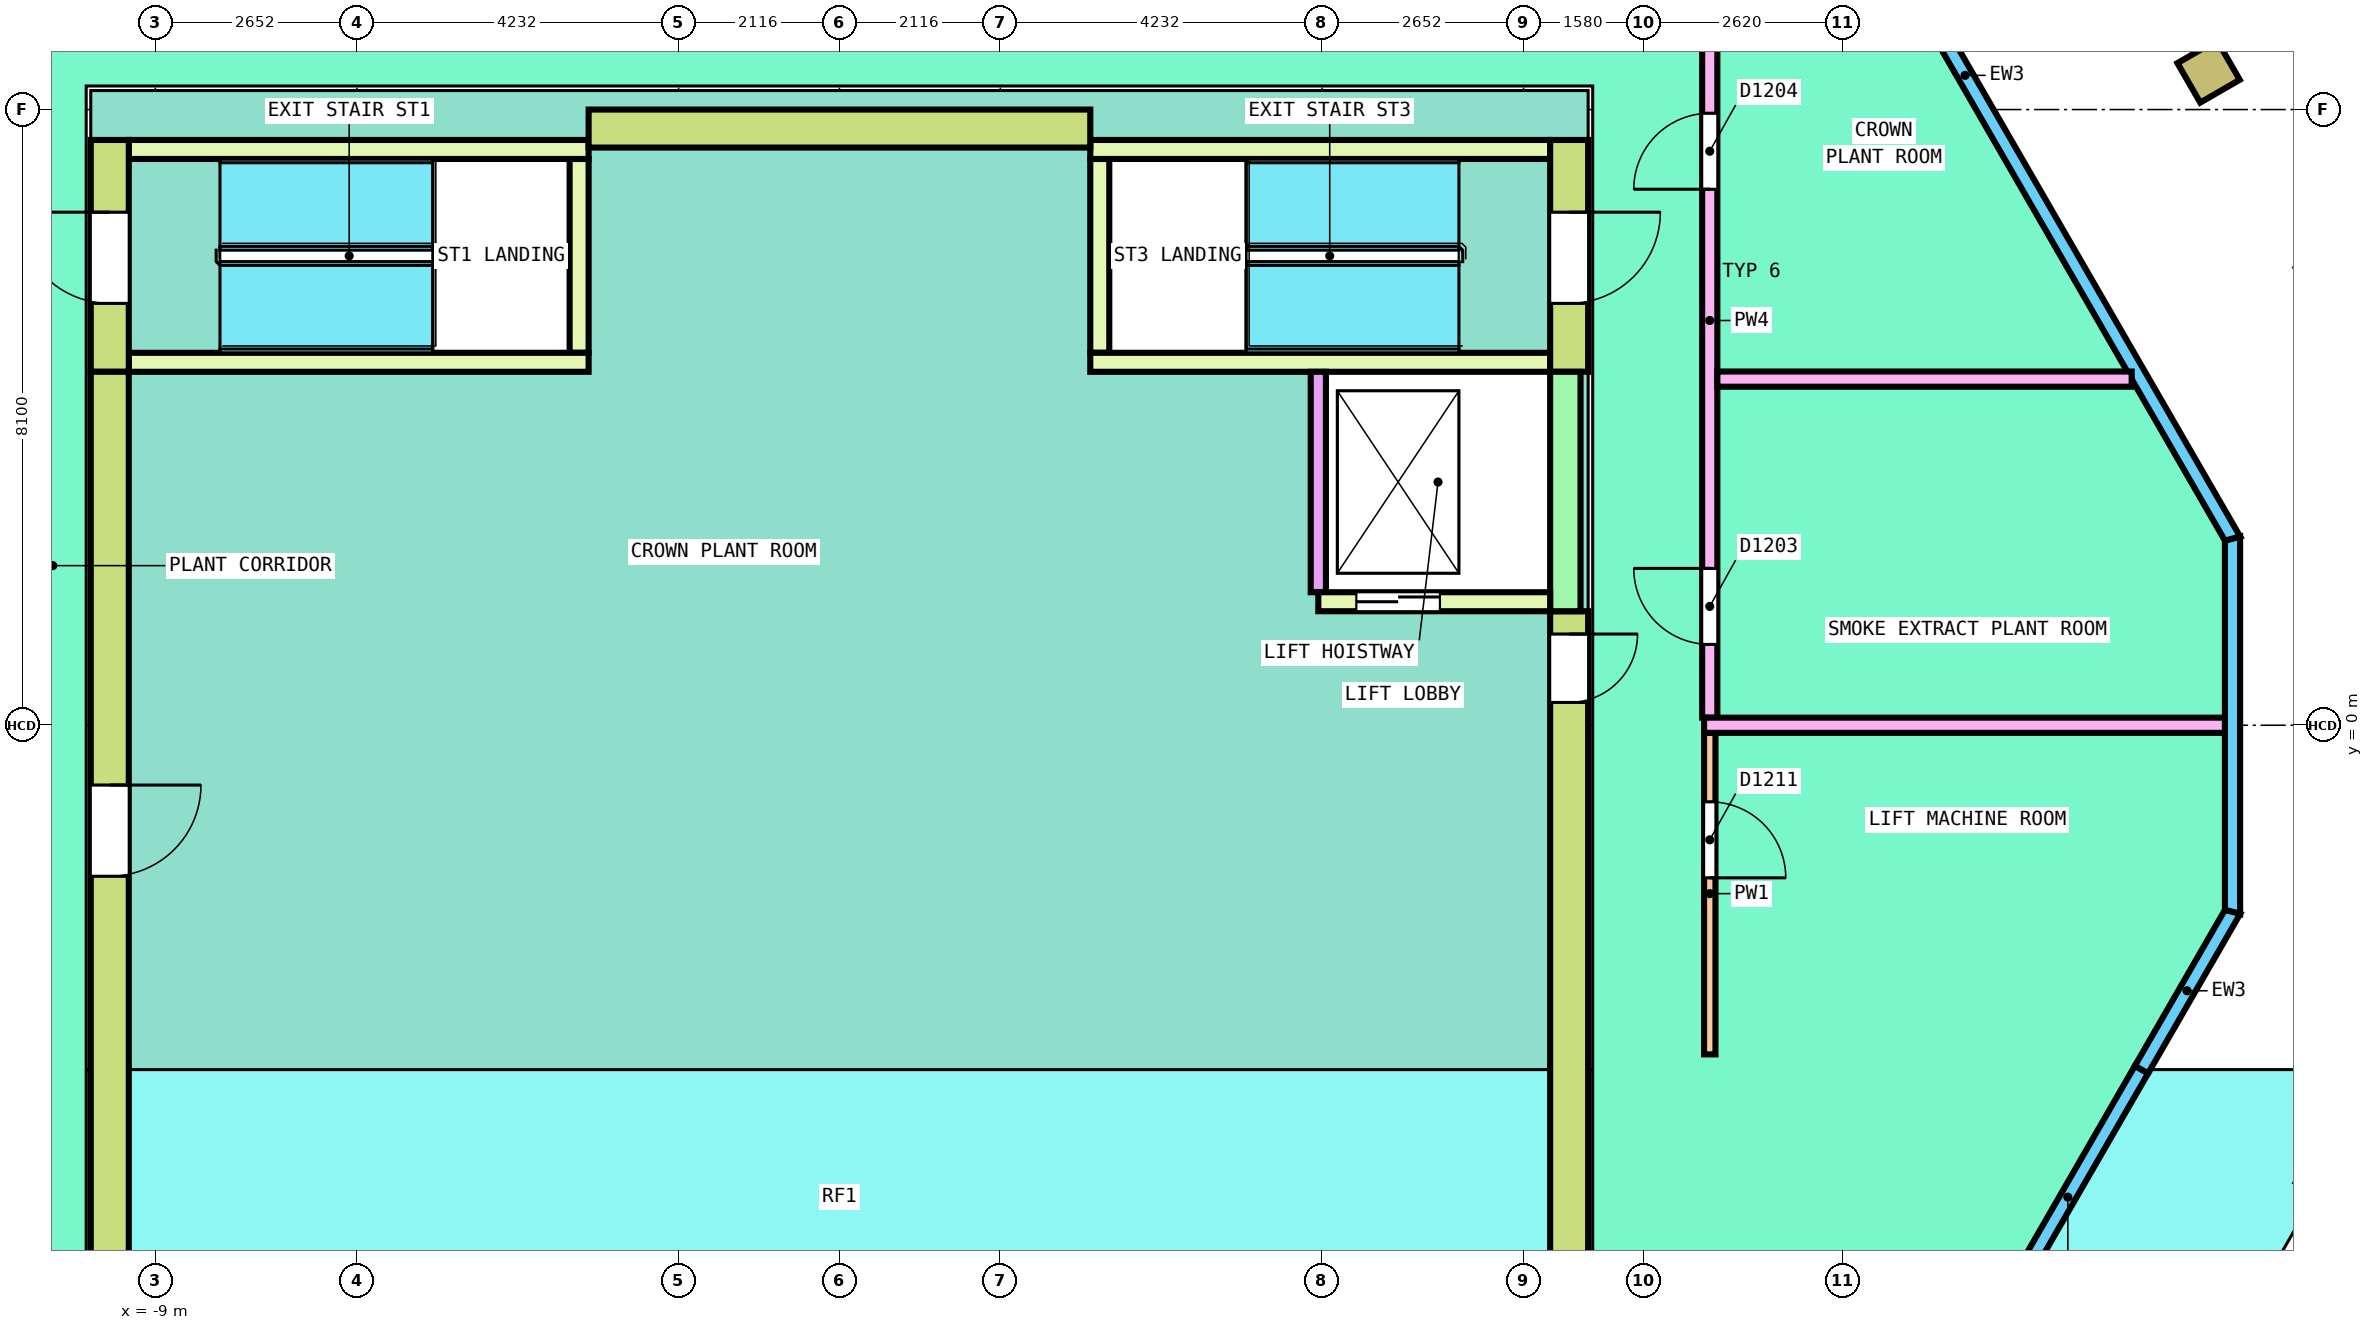
"""IFC4 building model, lengths in metres.
Left out: names, types, materials, properties, quantities, classifications, styles, units other than length and angle.
Written with IfcOpenShell. Run it as: python <this file> out.ifc"""

import sys

from ifc_helpers import new_model, si_unit, direction, frame, frame_2d, origin, origin_2d, place, context, subcontext, project, spatial, polyline, rectangle, hollow_rectangle, outline, extrude, element, fill, save


model = new_model("IFC4")
c1 = context("Model", 3, precision=1e-05, world=origin(), true_north=direction((0.0, 1.0)))
c2 = subcontext(c1, "Body", "Model", "MODEL_VIEW")
j1 = project(units=[si_unit("LENGTHUNIT", "METRE"), si_unit("PLANEANGLEUNIT", "RADIAN")], contexts=[c1])
p1 = place(None, origin())
s1 = spatial("IfcSite", under=j1, at=p1, CompositionType="ELEMENT")
p2 = place(p1, origin())
s2 = spatial("IfcBuilding", under=s1, at=p2, CompositionType="ELEMENT")
p3 = place(p2, frame((0.0, 0.0, 360.6)))
s3 = spatial("IfcBuildingStorey", under=s2, at=p3, CompositionType="ELEMENT", Elevation=360.6)
p4 = place(p3, frame((18.013, 8.601, 0.0), z_axis=(0.0, 0.0, 1.0), x_axis=(-0.5, 0.866025403784, 0.0)))
e1 = element("IfcColumn", 1, at=p4, inside=s3, PredefinedType="COLUMN", context=c2, shape_type="SweptSolid", body=[
    extrude(hollow_rectangle(XDim=0.6, YDim=0.6, WallThickness=0.04, InnerFilletRadius=0.04, OuterFilletRadius=0.08, at=origin_2d()), origin(), (0.0, 0.0, 1.0), 4.0),
])
p5 = place(p3, frame((18.327, -2.456, 0.0), z_axis=(0.0, 0.0, 1.0), x_axis=(0.0, 1.0, 0.0)))
e2 = element("IfcWall", 2, at=p5, inside=s3, PredefinedType="SOLIDWALL", context=c2, shape_type="SweptSolid", body=[
    extrude(outline(polyline([(-0.027, -0.1), (4.938, -0.1), (4.885, 0.1), (0.027, 0.1), (-0.027, -0.1)])), origin(), (0.0, 0.0, 1.0), 3.8),
])
p6 = place(p3, frame((18.327, 2.456, 0.0), z_axis=(0.0, 0.0, 1.0), x_axis=(-0.499991740577, 0.866030172312, 0.0)))
e3 = element("IfcWall", 3, at=p6, inside=s3, PredefinedType="SOLIDWALL", context=c2, shape_type="SweptSolid", body=[
    extrude(outline(polyline([(-0.027, -0.1), (14.101, -0.1), (14.047, 0.1), (0.027, 0.1), (-0.027, -0.1)])), origin(), (0.0, 0.0, 1.0), 3.8),
])
p7 = place(p3, frame((15.192, -7.887, 0.0), z_axis=(0.0, 0.0, 1.0), x_axis=(0.500027802648, 0.866009351323, 0.0)))
e4 = element("IfcWall", 4, at=p7, inside=s3, PredefinedType="SOLIDWALL", context=c2, shape_type="SweptSolid", body=[
    extrude(outline(polyline([(0.0, 0.0), (3.876, 0.0), (3.875, 4.0), (0.0, 0.03), (0.0, 0.0)])), frame((0.0, 0.1, 0.0), z_axis=(0.0, -1.0, 0.0), x_axis=(1.0, 0.0, 0.0)), (0.0, 0.0, 1.0), 0.2),
])
p8 = place(p3, frame((17.13, -4.53, 0.0), z_axis=(0.0, 0.0, 1.0), x_axis=(0.499943030081, 0.866058292884, 0.0)))
e5 = element("IfcWall", 5, at=p8, inside=s3, PredefinedType="SOLIDWALL", context=c2, shape_type="SweptSolid", body=[
    extrude(outline(polyline([(0.0, -0.1), (2.422, -0.1), (2.368, 0.1), (0.0, 0.1), (0.0, -0.1)])), origin(), (0.0, 0.0, 1.0), 3.8),
])
p9 = place(p3, frame((9.6, -7.487, 0.0), z_axis=(0.0, 0.0, 1.0), x_axis=(0.0, 1.0, 0.0)))
e6 = element("IfcWall", 6, at=p9, inside=s3, PredefinedType="SHEAR", context=c2, shape_type="SweptSolid", body=[
    extrude(outline(polyline([(0.0, 0.0), (8.987, 0.0), (8.987, 3.8), (6.956, 3.8), (2.956, 3.8), (0.0, 0.477), (0.0, 0.0)])), frame((0.0, 0.25, 0.0), z_axis=(0.0, -1.0, 0.0), x_axis=(1.0, 0.0, 0.0)), (0.0, 0.0, 1.0), 0.5),
])
p10 = place(p9, frame((7.787, 0.0, 0.0)))
e7 = element("IfcOpeningElement", 7, at=p10, cuts=e6, PredefinedType="OPENING", context=c2, shape_type="SweptSolid", body=[
    extrude(rectangle(XDim=0.9, YDim=2.1, at=frame_2d((0.45, 1.05))), frame((0.0, 0.26, 0.0), z_axis=(0.0, -1.0, 0.0), x_axis=(1.0, 0.0, 0.0)), (0.0, 0.0, 1.0), 0.52),
])
p11 = place(p3, frame((3.3, 7.85, 0.0), z_axis=(0.0, 0.0, 1.0), x_axis=(-1.0, 0.0, 0.0)))
e8 = element("IfcWall", 8, at=p11, inside=s3, PredefinedType="SHEAR", context=c2, shape_type="SweptSolid", body=[
    extrude(rectangle(XDim=6.6, YDim=0.5, at=frame_2d((3.3, 0.0))), origin(), (0.0, 0.0, 1.0), 3.8),
])
p12 = place(p3, frame((-9.6, 4.65, 0.0), z_axis=(0.0, 0.0, 1.0), x_axis=(0.0, -1.0, 0.0)))
e9 = element("IfcWall", 9, at=p12, inside=s3, PredefinedType="SHEAR", context=c2, shape_type="SweptSolid", body=[
    extrude(outline(polyline([(0.0, 0.0), (12.136, 0.0), (12.137, 0.477), (9.18, 3.8), (5.18, 3.8), (0.0, 3.8), (0.0, 0.0)])), frame((0.0, 0.25, 0.0), z_axis=(0.0, -1.0, 0.0), x_axis=(1.0, 0.0, 0.0)), (0.0, 0.0, 1.0), 0.5),
])
p13 = place(p12, frame((5.437, 0.0, 0.0)))
e10 = element("IfcOpeningElement", 10, at=p13, cuts=e9, PredefinedType="OPENING", context=c2, shape_type="SweptSolid", body=[
    extrude(rectangle(XDim=1.2, YDim=2.1, at=frame_2d((0.6, 1.05))), frame((0.0, 0.26, 0.0), z_axis=(0.0, -1.0, 0.0), x_axis=(1.0, 0.0, 0.0)), (0.0, 0.0, 1.0), 0.52),
])
p14 = place(p3, frame((-9.6, 4.65, 0.0), z_axis=(0.0, 0.0, 1.0), x_axis=(0.0, 1.0, 0.0)))
e11 = element("IfcWall", 11, at=p14, inside=s3, PredefinedType="SHEAR", context=c2, shape_type="SweptSolid", body=[
    extrude(rectangle(XDim=3.05, YDim=0.5, at=frame_2d((1.525, 0.0))), origin(), (0.0, 0.0, 1.0), 3.8),
])
p15 = place(p14, frame((0.9, 0.0, 0.0)))
e12 = element("IfcOpeningElement", 12, at=p15, cuts=e11, PredefinedType="OPENING", context=c2, shape_type="SweptSolid", body=[
    extrude(rectangle(XDim=1.2, YDim=2.1, at=frame_2d((0.6, 1.05))), frame((0.0, 0.26, 0.0), z_axis=(0.0, -1.0, 0.0), x_axis=(1.0, 0.0, 0.0)), (0.0, 0.0, 1.0), 0.52),
])
p16 = place(p3, frame((-3.425, 4.9, 0.0), z_axis=(0.0, 0.0, 1.0), x_axis=(0.0, 1.0, 0.0)))
e13 = element("IfcWall", 13, at=p16, inside=s3, PredefinedType="SOLIDWALL", context=c2, shape_type="SweptSolid", body=[
    extrude(rectangle(XDim=2.55, YDim=0.25, at=frame_2d((1.275, 0.0))), origin(), (0.0, 0.0, 1.0), 3.8),
])
for number, where, z_axis, x_axis in (
    (14, (-9.35, 4.775, 0.0), (0.0, 0.0, 1.0), (1.0, 0.0, 0.0)),
    (15, (-9.35, 7.575, 0.0), (0.0, 0.0, 1.0), (1.0, 0.0, 0.0)),
):
    element("IfcWall", number, at=place(p3, frame(where, z_axis=z_axis, x_axis=x_axis)), inside=s3, PredefinedType="SOLIDWALL", context=c2, shape_type="SweptSolid", body=[
        extrude(rectangle(XDim=6.05, YDim=0.25, at=frame_2d((3.025, 0.0))), origin(), (0.0, 0.0, 1.0), 3.8),
    ])
p17 = place(p3, frame((9.6, 4.65, 0.0), z_axis=(0.0, 0.0, 1.0), x_axis=(0.0, 1.0, 0.0)))
e16 = element("IfcWall", 16, at=p17, inside=s3, PredefinedType="SHEAR", context=c2, shape_type="SweptSolid", body=[
    extrude(rectangle(XDim=3.05, YDim=0.5, at=frame_2d((1.525, 0.0))), origin(), (0.0, 0.0, 1.0), 3.8),
])
p18 = place(p17, frame((0.9, 0.0, 0.0)))
e17 = element("IfcOpeningElement", 17, at=p18, cuts=e16, PredefinedType="OPENING", context=c2, shape_type="SweptSolid", body=[
    extrude(rectangle(XDim=1.2, YDim=2.1, at=frame_2d((0.6, 1.05))), frame((0.0, 0.26, 0.0), z_axis=(0.0, -1.0, 0.0), x_axis=(1.0, 0.0, 0.0)), (0.0, 0.0, 1.0), 0.52),
])
p19 = place(p3, frame((3.425, 4.9, 0.0), z_axis=(0.0, 0.0, 1.0), x_axis=(0.0, 1.0, 0.0)))
e18 = element("IfcWall", 18, at=p19, inside=s3, PredefinedType="SOLIDWALL", context=c2, shape_type="SweptSolid", body=[
    extrude(rectangle(XDim=2.55, YDim=0.25, at=frame_2d((1.275, 0.0))), origin(), (0.0, 0.0, 1.0), 3.8),
])
for number, where, z_axis, x_axis in (
    (19, (3.3, 4.775, 0.0), (0.0, 0.0, 1.0), (1.0, 0.0, 0.0)),
    (20, (3.3, 7.575, 0.0), (0.0, 0.0, 1.0), (1.0, 0.0, 0.0)),
):
    element("IfcWall", number, at=place(p3, frame(where, z_axis=z_axis, x_axis=x_axis)), inside=s3, PredefinedType="SOLIDWALL", context=c2, shape_type="SweptSolid", body=[
        extrude(rectangle(XDim=6.05, YDim=0.25, at=frame_2d((3.025, 0.0))), origin(), (0.0, 0.0, 1.0), 3.8),
    ])
p20 = place(p3, frame((6.3, 1.625, 0.0), z_axis=(0.0, 0.0, 1.0), x_axis=(1.0, 0.0, 0.0)))
e21 = element("IfcWall", 21, at=p20, inside=s3, PredefinedType="SOLIDWALL", context=c2, shape_type="SweptSolid", body=[
    extrude(rectangle(XDim=3.05, YDim=0.25, at=frame_2d((1.525, 0.0))), origin(), (0.0, 0.0, 1.0), 3.8),
])
p21 = place(p20, frame((0.5, 0.0, 0.0)))
e22 = element("IfcOpeningElement", 22, at=p21, cuts=e21, PredefinedType="OPENING", context=c2, shape_type="SweptSolid", body=[
    extrude(rectangle(XDim=1.1, YDim=2.1, at=frame_2d((0.55, 1.05))), frame((0.0, 0.135, 0.0), z_axis=(0.0, -1.0, 0.0), x_axis=(1.0, 0.0, 0.0)), (0.0, 0.0, 1.0), 0.27),
])
p22 = place(p3, frame((6.3, 1.75, 0.0), z_axis=(0.0, 0.0, 1.0), x_axis=(0.0, 1.0, 0.0)))
e23 = element("IfcWall", 23, at=p22, inside=s3, PredefinedType="SOLIDWALL", context=c2, shape_type="SweptSolid", body=[
    extrude(rectangle(XDim=2.9, YDim=0.2, at=frame_2d((1.45, 0.0))), origin(), (0.0, 0.0, 1.0), 3.8),
])
p23 = place(p3, frame((9.55, 1.5, 0.0), z_axis=(0.0, 0.0, 1.0), x_axis=(0.0, 1.0, 0.0)))
e24 = element("IfcWall", 24, at=p23, inside=s3, PredefinedType="SHEAR", context=c2, shape_type="SweptSolid", body=[
    extrude(rectangle(XDim=3.15, YDim=0.4, at=frame_2d((1.575, 0.0))), origin(), (0.0, 0.0, 1.0), 3.8),
])
p24 = place(p3, frame((11.45, -4.33, 0.0), z_axis=(0.0, 0.0, 1.0), x_axis=(0.0, 1.0, 0.0)))
e25 = element("IfcWall", 25, at=p24, inside=s3, PredefinedType="PARTITIONING", context=c2, shape_type="SweptSolid", body=[
    extrude(rectangle(XDim=4.23, YDim=0.15, at=frame_2d((2.115, 0.0))), origin(), (0.0, 0.0, 1.0), 3.2),
])
p25 = place(p24, frame((2.323, 0.0, 0.0)))
e26 = element("IfcOpeningElement", 26, at=p25, cuts=e25, PredefinedType="OPENING", context=c2, shape_type="SweptSolid", body=[
    extrude(rectangle(XDim=1.0, YDim=2.1, at=frame_2d((0.5, 1.05))), frame((0.0, 0.085, 0.0), z_axis=(0.0, -1.0, 0.0), x_axis=(1.0, 0.0, 0.0)), (0.0, 0.0, 1.0), 0.17),
])
p26 = place(p3, frame((11.45, 0.1, 0.0), z_axis=(0.0, 0.0, 1.0), x_axis=(0.0, 1.0, 0.0)))
e27 = element("IfcWall", 27, at=p26, inside=s3, PredefinedType="PARTITIONING", context=c2, shape_type="SweptSolid", body=[
    extrude(rectangle(XDim=10.45, YDim=0.2, at=frame_2d((5.225, 0.0))), origin(), (0.0, 0.0, 1.0), 3.3),
])
p27 = place(p26, frame((0.963, 0.0, 0.0)))
e28 = element("IfcOpeningElement", 28, at=p27, cuts=e27, PredefinedType="OPENING", context=c2, shape_type="SweptSolid", body=[
    extrude(rectangle(XDim=1.0, YDim=2.1, at=frame_2d((0.5, 1.05))), frame((0.0, 0.11, 0.0), z_axis=(0.0, -1.0, 0.0), x_axis=(1.0, 0.0, 0.0)), (0.0, 0.0, 1.0), 0.22),
])
p28 = place(p26, frame((6.952, 0.0, 0.0)))
e29 = element("IfcOpeningElement", 29, at=p28, cuts=e27, PredefinedType="OPENING", context=c2, shape_type="SweptSolid", body=[
    extrude(rectangle(XDim=1.0, YDim=2.1, at=frame_2d((0.5, 1.05))), frame((0.0, 0.11, 0.0), z_axis=(0.0, -1.0, 0.0), x_axis=(1.0, 0.0, 0.0)), (0.0, 0.0, 1.0), 0.22),
])
p29 = place(p3, frame((11.55, 4.554, 0.0), z_axis=(0.0, 0.0, 1.0), x_axis=(1.0, 0.0, 0.0)))
e30 = element("IfcWall", 30, at=p29, inside=s3, PredefinedType="PARTITIONING", context=c2, shape_type="SweptSolid", body=[
    extrude(rectangle(XDim=5.451, YDim=0.2, at=frame_2d((2.726, 0.0))), origin(), (0.0, 0.0, 1.0), 3.3),
])
p30 = place(p3, frame((11.375, 0.0, 0.0), z_axis=(0.0, 0.0, 1.0), x_axis=(1.0, 0.0, 0.0)))
e31 = element("IfcWall", 31, at=p30, inside=s3, PredefinedType="PARTITIONING", context=c2, shape_type="SweptSolid", body=[
    extrude(rectangle(XDim=6.853, YDim=0.2, at=frame_2d((3.426, 0.0))), origin(), (0.0, 0.0, 1.0), 3.3),
])
p31 = place(p15, origin())
e32 = element("IfcDoor", 32, at=p31, inside=s3, OperationType="SINGLE_SWING_LEFT", PredefinedType="DOOR", context=c2, shape_type="SweptSolid", body=[
    extrude(rectangle(XDim=1.2, YDim=2.1, at=frame_2d((0.6, 1.05))), frame((0.0, 0.2, 0.0), z_axis=(0.0, -1.0, 0.0), x_axis=(1.0, 0.0, 0.0)), (0.0, 0.0, 1.0), 0.4),
])
fill(e12, e32)
p32 = place(p18, origin())
e33 = element("IfcDoor", 33, at=p32, inside=s3, OperationType="SINGLE_SWING_RIGHT", PredefinedType="DOOR", context=c2, shape_type="SweptSolid", body=[
    extrude(rectangle(XDim=1.2, YDim=2.1, at=frame_2d((0.6, 1.05))), frame((0.0, 0.2, 0.0), z_axis=(0.0, -1.0, 0.0), x_axis=(1.0, 0.0, 0.0)), (0.0, 0.0, 1.0), 0.4),
])
fill(e17, e33)
p33 = place(p21, origin())
e34 = element("IfcDoor", 34, at=p33, inside=s3, OperationType="DOUBLE_DOOR_SLIDING", PredefinedType="DOOR", context=c2, shape_type="SweptSolid", body=[
    extrude(rectangle(XDim=1.1, YDim=2.1, at=frame_2d((0.55, 1.05))), frame((0.0, 0.075, 0.0), z_axis=(0.0, -1.0, 0.0), x_axis=(1.0, 0.0, 0.0)), (0.0, 0.0, 1.0), 0.15),
])
fill(e22, e34)
p34 = place(p10, origin())
e35 = element("IfcDoor", 35, at=p34, inside=s3, OperationType="SINGLE_SWING_RIGHT", PredefinedType="DOOR", context=c2, shape_type="SweptSolid", body=[
    extrude(rectangle(XDim=0.9, YDim=2.1, at=frame_2d((0.45, 1.05))), frame((0.0, 0.2, 0.0), z_axis=(0.0, -1.0, 0.0), x_axis=(1.0, 0.0, 0.0)), (0.0, 0.0, 1.0), 0.4),
])
fill(e7, e35)
p35 = place(p13, origin())
e36 = element("IfcDoor", 36, at=p35, inside=s3, OperationType="SINGLE_SWING_LEFT", PredefinedType="DOOR", context=c2, shape_type="SweptSolid", body=[
    extrude(rectangle(XDim=1.2, YDim=2.1, at=frame_2d((0.6, 1.05))), frame((0.0, 0.2, 0.0), z_axis=(0.0, -1.0, 0.0), x_axis=(1.0, 0.0, 0.0)), (0.0, 0.0, 1.0), 0.4),
])
fill(e10, e36)
p36 = place(p27, origin())
e37 = element("IfcDoor", 37, at=p36, inside=s3, OperationType="SINGLE_SWING_RIGHT", PredefinedType="DOOR", context=c2, shape_type="SweptSolid", body=[
    extrude(rectangle(XDim=1.0, YDim=2.1, at=frame_2d((0.5, 1.05))), frame((0.0, 0.025, 0.0), z_axis=(0.0, -1.0, 0.0), x_axis=(1.0, 0.0, 0.0)), (0.0, 0.0, 1.0), 0.05),
])
fill(e28, e37)
p37 = place(p28, origin())
e38 = element("IfcDoor", 38, at=p37, inside=s3, OperationType="SINGLE_SWING_RIGHT", PredefinedType="DOOR", context=c2, shape_type="SweptSolid", body=[
    extrude(rectangle(XDim=1.0, YDim=2.1, at=frame_2d((0.5, 1.05))), frame((0.0, 0.025, 0.0), z_axis=(0.0, -1.0, 0.0), x_axis=(1.0, 0.0, 0.0)), (0.0, 0.0, 1.0), 0.05),
])
fill(e29, e38)
p38 = place(p25, origin())
e39 = element("IfcDoor", 39, at=p38, inside=s3, OperationType="SINGLE_SWING_LEFT", PredefinedType="DOOR", context=c2, shape_type="SweptSolid", body=[
    extrude(rectangle(XDim=1.0, YDim=2.1, at=frame_2d((0.5, 1.05))), frame((0.0, 0.025, 0.0), z_axis=(0.0, -1.0, 0.0), x_axis=(1.0, 0.0, 0.0)), (0.0, 0.0, 1.0), 0.05),
])
fill(e26, e39)
save(model, sys.argv[1])
